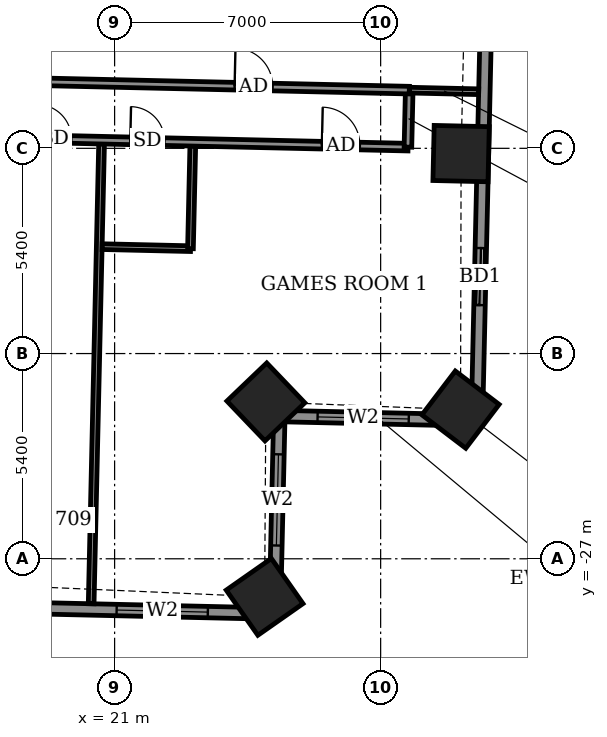
"""IFC4 building model, lengths in metres.
Left out: names, types, materials, properties, quantities, classifications, styles, units other than length and angle.
Written with IfcOpenShell. Run it as: python <this file> out.ifc"""

import sys

from ifc_helpers import new_model, si_unit, direction, frame, frame_2d, origin, origin_2d, place, context, subcontext, project, spatial, rectangle, extrude, element, fill, save


model = new_model("IFC4")
c1 = context("Model", 3, precision=1e-05, world=origin(), true_north=direction((0.0, 1.0)))
c2 = subcontext(c1, "Body", "Model", "MODEL_VIEW")
j1 = project(units=[si_unit("LENGTHUNIT", "METRE"), si_unit("PLANEANGLEUNIT", "RADIAN")], contexts=[c1])
p1 = place(None, origin())
s1 = spatial("IfcSite", under=j1, at=p1, CompositionType="ELEMENT")
p2 = place(p1, origin())
s2 = spatial("IfcBuilding", under=s1, at=p2, CompositionType="ELEMENT")
p3 = place(p2, frame((0.0, 0.0, 71.1)))
s3 = spatial("IfcBuildingStorey", under=s2, at=p3, CompositionType="ELEMENT", Elevation=71.1)
for number, where, z_axis, x_axis in (
    (1, (24.947, -28.002, -0.55), (0.0, 0.0, 1.0), (0.819, 0.574, 0.0)),
    (2, (24.98, -22.873, -0.55), (0.0, 0.0, 1.0), (0.723, 0.691, 0.0)),
    (3, (30.102, -23.076, -0.55), (0.0, 0.0, 1.0), (0.606, 0.796, 0.0)),
    (4, (30.117, -16.339, -0.55), (0.0, 0.0, 1.0), (0.023, 1.0, 0.0)),
):
    element("IfcColumn", number, at=place(p3, frame(where, z_axis=z_axis, x_axis=x_axis)), inside=s3, PredefinedType="COLUMN", context=c2, shape_type="SweptSolid", body=[
        extrude(rectangle(XDim=1.45, YDim=1.45, at=origin_2d()), origin(), (0.0, 0.0, 1.0), 3.6),
    ])
p4 = place(p3, frame((30.533, -23.362, 0.0), z_axis=(0.0, 0.0, 1.0), x_axis=(0.022698800888, 0.999742349027, 0.0)))
e5 = element("IfcWall", 5, at=p4, inside=s3, PredefinedType="SOLIDWALL", context=c2, shape_type="SweptSolid", body=[
    extrude(rectangle(XDim=14.23, YDim=0.3, at=frame_2d((7.115, 0.0))), origin(), (0.0, 0.0, 1.0), 3.05),
])
p5 = place(p4, frame((3.038, 0.0, 0.0)))
e6 = element("IfcOpeningElement", 6, at=p5, cuts=e5, PredefinedType="OPENING", context=c2, shape_type="SweptSolid", body=[
    extrude(rectangle(XDim=1.5, YDim=2.4, at=frame_2d((0.75, 1.2))), frame((0.0, 0.16, 0.0), z_axis=(0.0, -1.0, 0.0), x_axis=(1.0, 0.0, 0.0)), (0.0, 0.0, 1.0), 0.32),
])
p6 = place(p4, frame((9.95, 0.0, 0.9)))
e7 = element("IfcOpeningElement", 7, at=p6, cuts=e5, PredefinedType="OPENING", context=c2, shape_type="SweptSolid", body=[
    extrude(rectangle(XDim=2.4, YDim=1.5, at=frame_2d((1.2, 0.75))), frame((0.0, 0.16, 0.0), z_axis=(0.0, -1.0, 0.0), x_axis=(1.0, 0.0, 0.0)), (0.0, 0.0, 1.0), 0.32),
])
p7 = place(p3, frame((-24.007, -27.326, 0.0), z_axis=(0.0, 0.0, 1.0), x_axis=(0.999742536491, -0.022690542744, 0.0)))
e8 = element("IfcWall", 8, at=p7, inside=s3, PredefinedType="SOLIDWALL", context=c2, shape_type="SweptSolid", body=[
    extrude(rectangle(XDim=49.236, YDim=0.3, at=frame_2d((24.618, 0.0))), origin(), (0.0, 0.0, 1.0), 3.05),
])
p8 = place(p7, frame((1.391, 0.0, 0.0)))
e9 = element("IfcOpeningElement", 9, at=p8, cuts=e8, PredefinedType="OPENING", context=c2, shape_type="SweptSolid", body=[
    extrude(rectangle(XDim=1.2, YDim=2.4, at=frame_2d((0.6, 1.2))), frame((0.0, 0.16, 0.0), z_axis=(0.0, -1.0, 0.0), x_axis=(1.0, 0.0, 0.0)), (0.0, 0.0, 1.0), 0.32),
])
p9 = place(p7, frame((3.901, 0.0, 0.0)))
e10 = element("IfcOpeningElement", 10, at=p9, cuts=e8, PredefinedType="OPENING", context=c2, shape_type="SweptSolid", body=[
    extrude(rectangle(XDim=1.5, YDim=2.4, at=frame_2d((0.75, 1.2))), frame((0.0, 0.16, 0.0), z_axis=(0.0, -1.0, 0.0), x_axis=(1.0, 0.0, 0.0)), (0.0, 0.0, 1.0), 0.32),
])
p10 = place(p7, frame((9.1, 0.0, 0.0)))
e11 = element("IfcOpeningElement", 11, at=p10, cuts=e8, PredefinedType="OPENING", context=c2, shape_type="SweptSolid", body=[
    extrude(rectangle(XDim=1.5, YDim=2.4, at=frame_2d((0.75, 1.2))), frame((0.0, 0.16, 0.0), z_axis=(0.0, -1.0, 0.0), x_axis=(1.0, 0.0, 0.0)), (0.0, 0.0, 1.0), 0.32),
])
p11 = place(p7, frame((14.889, 0.0, 0.0)))
e12 = element("IfcOpeningElement", 12, at=p11, cuts=e8, PredefinedType="OPENING", context=c2, shape_type="SweptSolid", body=[
    extrude(rectangle(XDim=1.5, YDim=2.4, at=frame_2d((0.75, 1.2))), frame((0.0, 0.16, 0.0), z_axis=(0.0, -1.0, 0.0), x_axis=(1.0, 0.0, 0.0)), (0.0, 0.0, 1.0), 0.32),
])
p12 = place(p7, frame((17.952, 0.0, 0.0)))
e13 = element("IfcOpeningElement", 13, at=p12, cuts=e8, PredefinedType="OPENING", context=c2, shape_type="SweptSolid", body=[
    extrude(rectangle(XDim=1.5, YDim=2.4, at=frame_2d((0.75, 1.2))), frame((0.0, 0.16, 0.0), z_axis=(0.0, -1.0, 0.0), x_axis=(1.0, 0.0, 0.0)), (0.0, 0.0, 1.0), 0.32),
])
p13 = place(p7, frame((22.878, 0.0, 0.0)))
e14 = element("IfcOpeningElement", 14, at=p13, cuts=e8, PredefinedType="OPENING", context=c2, shape_type="SweptSolid", body=[
    extrude(rectangle(XDim=1.5, YDim=2.4, at=frame_2d((0.75, 1.2))), frame((0.0, 0.16, 0.0), z_axis=(0.0, -1.0, 0.0), x_axis=(1.0, 0.0, 0.0)), (0.0, 0.0, 1.0), 0.32),
])
p14 = place(p7, frame((26.091, 0.0, 0.0)))
e15 = element("IfcOpeningElement", 15, at=p14, cuts=e8, PredefinedType="OPENING", context=c2, shape_type="SweptSolid", body=[
    extrude(rectangle(XDim=1.2, YDim=2.4, at=frame_2d((0.6, 1.2))), frame((0.0, 0.16, 0.0), z_axis=(0.0, -1.0, 0.0), x_axis=(1.0, 0.0, 0.0)), (0.0, 0.0, 1.0), 0.32),
])
p15 = place(p7, frame((31.754, 0.0, 0.0)))
e16 = element("IfcOpeningElement", 16, at=p15, cuts=e8, PredefinedType="OPENING", context=c2, shape_type="SweptSolid", body=[
    extrude(rectangle(XDim=1.5, YDim=2.4, at=frame_2d((0.75, 1.2))), frame((0.0, 0.16, 0.0), z_axis=(0.0, -1.0, 0.0), x_axis=(1.0, 0.0, 0.0)), (0.0, 0.0, 1.0), 0.32),
])
p16 = place(p7, frame((36.854, 0.0, 0.0)))
e17 = element("IfcOpeningElement", 17, at=p16, cuts=e8, PredefinedType="OPENING", context=c2, shape_type="SweptSolid", body=[
    extrude(rectangle(XDim=1.5, YDim=2.4, at=frame_2d((0.75, 1.2))), frame((0.0, 0.16, 0.0), z_axis=(0.0, -1.0, 0.0), x_axis=(1.0, 0.0, 0.0)), (0.0, 0.0, 1.0), 0.32),
])
p17 = place(p7, frame((39.917, 0.0, 0.0)))
e18 = element("IfcOpeningElement", 18, at=p17, cuts=e8, PredefinedType="OPENING", context=c2, shape_type="SweptSolid", body=[
    extrude(rectangle(XDim=1.5, YDim=2.4, at=frame_2d((0.75, 1.2))), frame((0.0, 0.16, 0.0), z_axis=(0.0, -1.0, 0.0), x_axis=(1.0, 0.0, 0.0)), (0.0, 0.0, 1.0), 0.32),
])
p18 = place(p7, frame((45.072, 0.0, 0.9)))
e19 = element("IfcOpeningElement", 19, at=p18, cuts=e8, PredefinedType="OPENING", context=c2, shape_type="SweptSolid", body=[
    extrude(rectangle(XDim=2.4, YDim=1.5, at=frame_2d((1.2, 0.75))), frame((0.0, 0.16, 0.0), z_axis=(0.0, -1.0, 0.0), x_axis=(1.0, 0.0, 0.0)), (0.0, 0.0, 1.0), 0.32),
])
p19 = place(p3, frame((25.216, -28.443, 0.0), z_axis=(0.0, 0.0, 1.0), x_axis=(0.022674484462, 0.999742900827, 0.0)))
e20 = element("IfcWall", 20, at=p19, inside=s3, PredefinedType="SOLIDWALL", context=c2, shape_type="SweptSolid", body=[
    extrude(rectangle(XDim=5.2, YDim=0.3, at=frame_2d((2.6, 0.0))), origin(), (0.0, 0.0, 1.0), 2.55),
])
p20 = place(p19, frame((1.793, 0.0, 0.9)))
e21 = element("IfcOpeningElement", 21, at=p20, cuts=e20, PredefinedType="OPENING", context=c2, shape_type="SweptSolid", body=[
    extrude(rectangle(XDim=2.4, YDim=1.5, at=frame_2d((1.2, 0.75))), frame((0.0, 0.16, 0.0), z_axis=(0.0, -1.0, 0.0), x_axis=(1.0, 0.0, 0.0)), (0.0, 0.0, 1.0), 0.32),
])
p21 = place(p3, frame((25.334, -23.244, 0.0), z_axis=(0.0, 0.0, 1.0), x_axis=(0.999741811307, -0.022722471786, 0.0)))
e22 = element("IfcWall", 22, at=p21, inside=s3, PredefinedType="SOLIDWALL", context=c2, shape_type="SweptSolid", body=[
    extrude(rectangle(XDim=5.2, YDim=0.3, at=frame_2d((2.6, 0.0))), origin(), (0.0, 0.0, 1.0), 2.55),
])
p22 = place(p21, frame((1.007, 0.0, 0.9)))
e23 = element("IfcOpeningElement", 23, at=p22, cuts=e22, PredefinedType="OPENING", context=c2, shape_type="SweptSolid", body=[
    extrude(rectangle(XDim=2.4, YDim=1.5, at=frame_2d((1.2, 0.75))), frame((0.0, 0.16, 0.0), z_axis=(0.0, -1.0, 0.0), x_axis=(1.0, 0.0, 0.0)), (0.0, 0.0, 1.0), 0.32),
])
p23 = place(p3, frame((20.383, -28.183, 0.0), z_axis=(0.0, 0.0, 1.0), x_axis=(0.022637991173, 0.99974372784, 0.0)))
e24 = element("IfcWall", 24, at=p23, inside=s3, PredefinedType="PARTITIONING", context=c2, shape_type="SweptSolid", body=[
    extrude(rectangle(XDim=12.1, YDim=0.15, at=frame_2d((6.05, 0.0))), origin(), (0.0, 0.0, 1.0), 2.55),
])
p24 = place(p3, frame((20.673, -18.787, 0.0), z_axis=(0.0, 0.0, 1.0), x_axis=(0.999740478815, -0.022781023197, 0.0)))
e25 = element("IfcWall", 25, at=p24, inside=s3, PredefinedType="PARTITIONING", context=c2, shape_type="SweptSolid", body=[
    extrude(rectangle(XDim=2.325, YDim=0.15, at=frame_2d((1.163, 0.0))), origin(), (0.0, 0.0, 1.0), 3.05),
])
p25 = place(p3, frame((22.996, -18.84, 0.0), z_axis=(0.0, 0.0, 1.0), x_axis=(0.022518033722, 0.999746436932, 0.0)))
e26 = element("IfcWall", 26, at=p25, inside=s3, PredefinedType="PARTITIONING", context=c2, shape_type="SweptSolid", body=[
    extrude(rectangle(XDim=2.7, YDim=0.15, at=frame_2d((1.35, 0.0))), origin(), (0.0, 0.0, 1.0), 3.05),
])
p26 = place(p3, frame((-26.151, -14.924, 0.0), z_axis=(0.0, 0.0, 1.0), x_axis=(0.999742750999, -0.022681089575, 0.0)))
e27 = element("IfcWall", 27, at=p26, inside=s3, PredefinedType="PARTITIONING", context=c2, shape_type="SweptSolid", body=[
    extrude(rectangle(XDim=54.886, YDim=0.2, at=frame_2d((27.443, 0.0))), origin(), (0.0, 0.0, 1.0), 3.05),
])
p27 = place(p26, frame((1.345, 0.0, 0.0)))
e28 = element("IfcOpeningElement", 28, at=p27, cuts=e27, PredefinedType="OPENING", context=c2, shape_type="SweptSolid", body=[
    extrude(rectangle(XDim=1.0, YDim=2.1, at=frame_2d((0.5, 1.05))), frame((0.0, 0.11, 0.0), z_axis=(0.0, -1.0, 0.0), x_axis=(1.0, 0.0, 0.0)), (0.0, 0.0, 1.0), 0.22),
])
p28 = place(p26, frame((8.35, 0.0, 0.0)))
e29 = element("IfcOpeningElement", 29, at=p28, cuts=e27, PredefinedType="OPENING", context=c2, shape_type="SweptSolid", body=[
    extrude(rectangle(XDim=0.9, YDim=2.1, at=frame_2d((0.45, 1.05))), frame((0.0, 0.11, 0.0), z_axis=(0.0, -1.0, 0.0), x_axis=(1.0, 0.0, 0.0)), (0.0, 0.0, 1.0), 0.22),
])
p29 = place(p26, frame((10.625, 0.0, 0.0)))
e30 = element("IfcOpeningElement", 30, at=p29, cuts=e27, PredefinedType="OPENING", context=c2, shape_type="SweptSolid", body=[
    extrude(rectangle(XDim=0.9, YDim=2.1, at=frame_2d((0.45, 1.05))), frame((0.0, 0.11, 0.0), z_axis=(0.0, -1.0, 0.0), x_axis=(1.0, 0.0, 0.0)), (0.0, 0.0, 1.0), 0.22),
])
p30 = place(p26, frame((17.675, 0.0, 0.0)))
e31 = element("IfcOpeningElement", 31, at=p30, cuts=e27, PredefinedType="OPENING", context=c2, shape_type="SweptSolid", body=[
    extrude(rectangle(XDim=0.9, YDim=2.1, at=frame_2d((0.45, 1.05))), frame((0.0, 0.11, 0.0), z_axis=(0.0, -1.0, 0.0), x_axis=(1.0, 0.0, 0.0)), (0.0, 0.0, 1.0), 0.22),
])
p31 = place(p26, frame((19.725, 0.0, 0.0)))
e32 = element("IfcOpeningElement", 32, at=p31, cuts=e27, PredefinedType="OPENING", context=c2, shape_type="SweptSolid", body=[
    extrude(rectangle(XDim=0.9, YDim=2.1, at=frame_2d((0.45, 1.05))), frame((0.0, 0.11, 0.0), z_axis=(0.0, -1.0, 0.0), x_axis=(1.0, 0.0, 0.0)), (0.0, 0.0, 1.0), 0.22),
])
p32 = place(p26, frame((26.575, 0.0, 0.0)))
e33 = element("IfcOpeningElement", 33, at=p32, cuts=e27, PredefinedType="OPENING", context=c2, shape_type="SweptSolid", body=[
    extrude(rectangle(XDim=0.9, YDim=2.1, at=frame_2d((0.45, 1.05))), frame((0.0, 0.11, 0.0), z_axis=(0.0, -1.0, 0.0), x_axis=(1.0, 0.0, 0.0)), (0.0, 0.0, 1.0), 0.22),
])
p33 = place(p26, frame((28.75, 0.0, 0.0)))
e34 = element("IfcOpeningElement", 34, at=p33, cuts=e27, PredefinedType="OPENING", context=c2, shape_type="SweptSolid", body=[
    extrude(rectangle(XDim=0.9, YDim=2.1, at=frame_2d((0.45, 1.05))), frame((0.0, 0.11, 0.0), z_axis=(0.0, -1.0, 0.0), x_axis=(1.0, 0.0, 0.0)), (0.0, 0.0, 1.0), 0.22),
])
p34 = place(p26, frame((35.875, 0.0, 0.0)))
e35 = element("IfcOpeningElement", 35, at=p34, cuts=e27, PredefinedType="OPENING", context=c2, shape_type="SweptSolid", body=[
    extrude(rectangle(XDim=0.9, YDim=2.1, at=frame_2d((0.45, 1.05))), frame((0.0, 0.11, 0.0), z_axis=(0.0, -1.0, 0.0), x_axis=(1.0, 0.0, 0.0)), (0.0, 0.0, 1.0), 0.22),
])
p35 = place(p26, frame((38.1, 0.0, 0.0)))
e36 = element("IfcOpeningElement", 36, at=p35, cuts=e27, PredefinedType="OPENING", context=c2, shape_type="SweptSolid", body=[
    extrude(rectangle(XDim=0.9, YDim=2.1, at=frame_2d((0.45, 1.05))), frame((0.0, 0.11, 0.0), z_axis=(0.0, -1.0, 0.0), x_axis=(1.0, 0.0, 0.0)), (0.0, 0.0, 1.0), 0.22),
])
p36 = place(p26, frame((45.125, 0.0, 0.0)))
e37 = element("IfcOpeningElement", 37, at=p36, cuts=e27, PredefinedType="OPENING", context=c2, shape_type="SweptSolid", body=[
    extrude(rectangle(XDim=0.9, YDim=2.1, at=frame_2d((0.45, 1.05))), frame((0.0, 0.11, 0.0), z_axis=(0.0, -1.0, 0.0), x_axis=(1.0, 0.0, 0.0)), (0.0, 0.0, 1.0), 0.22),
])
p37 = place(p26, frame((52.618, 0.0, 0.0)))
e38 = element("IfcOpeningElement", 38, at=p37, cuts=e27, PredefinedType="OPENING", context=c2, shape_type="SweptSolid", body=[
    extrude(rectangle(XDim=1.0, YDim=2.1, at=frame_2d((0.5, 1.05))), frame((0.0, 0.11, 0.0), z_axis=(0.0, -1.0, 0.0), x_axis=(1.0, 0.0, 0.0)), (0.0, 0.0, 1.0), 0.22),
])
p38 = place(p26, frame((47.575, 0.0, 0.0)))
e39 = element("IfcOpeningElement", 39, at=p38, cuts=e27, PredefinedType="OPENING", context=c2, shape_type="SweptSolid", body=[
    extrude(rectangle(XDim=0.9, YDim=2.1, at=frame_2d((0.45, 1.05))), frame((0.0, 0.11, 0.0), z_axis=(0.0, -1.0, 0.0), x_axis=(1.0, 0.0, 0.0)), (0.0, 0.0, 1.0), 0.22),
])
p39 = place(p3, frame((28.718, -16.169, 0.0), z_axis=(0.0, 0.0, 1.0), x_axis=(0.022617910375, 0.999744182344, 0.0)))
e40 = element("IfcWall", 40, at=p39, inside=s3, PredefinedType="PARTITIONING", context=c2, shape_type="SweptSolid", body=[
    extrude(rectangle(XDim=1.5, YDim=0.2, at=frame_2d((0.75, 0.0))), origin(), (0.0, 0.0, 1.0), 3.05),
])
p40 = place(p3, frame((18.382, -14.434, 0.0), z_axis=(0.0, 0.0, 1.0), x_axis=(0.999743763457, -0.022636418209, 0.0)))
e41 = element("IfcWall", 41, at=p40, inside=s3, PredefinedType="PARTITIONING", context=c2, shape_type="SweptSolid", body=[
    extrude(rectangle(XDim=10.375, YDim=0.2, at=frame_2d((5.188, 0.0))), origin(), (0.0, 0.0, 1.0), 3.05),
])
p41 = place(p40, frame((5.777, 0.0, 0.0)))
e42 = element("IfcOpeningElement", 42, at=p41, cuts=e41, PredefinedType="OPENING", context=c2, shape_type="SweptSolid", body=[
    extrude(rectangle(XDim=1.0, YDim=2.1, at=frame_2d((0.5, 1.05))), frame((0.0, 0.11, 0.0), z_axis=(0.0, -1.0, 0.0), x_axis=(1.0, 0.0, 0.0)), (0.0, 0.0, 1.0), 0.22),
])
p42 = place(p3, frame((28.755, -14.669, 0.0), z_axis=(0.0, 0.0, 1.0), x_axis=(0.999735161806, -0.023013175566, 0.0)))
e43 = element("IfcWall", 43, at=p42, inside=s3, PredefinedType="PARTITIONING", context=c2, shape_type="SweptSolid", body=[
    extrude(rectangle(XDim=1.825, YDim=0.15, at=frame_2d((0.912, 0.0))), origin(), (0.0, 0.0, 1.0), 2.55),
])
p43 = place(p5, origin())
e44 = element("IfcDoor", 44, at=p43, inside=s3, OperationType="SLIDING_TO_LEFT", PredefinedType="DOOR", context=c2, shape_type="SweptSolid", body=[
    extrude(rectangle(XDim=1.5, YDim=2.4, at=frame_2d((0.75, 1.2))), frame((0.0, 0.025, 0.0), z_axis=(0.0, -1.0, 0.0), x_axis=(1.0, 0.0, 0.0)), (0.0, 0.0, 1.0), 0.05),
])
fill(e6, e44)
p44 = place(p18, origin())
e45 = element("IfcWindow", 45, at=p44, inside=s3, PartitioningType="DOUBLE_PANEL_VERTICAL", PredefinedType="WINDOW", context=c2, shape_type="SweptSolid", body=[
    extrude(rectangle(XDim=2.4, YDim=1.5, at=frame_2d((1.2, 0.75))), frame((0.0, 0.03, 0.0), z_axis=(0.0, -1.0, 0.0), x_axis=(1.0, 0.0, 0.0)), (0.0, 0.0, 1.0), 0.06),
])
fill(e19, e45)
p45 = place(p20, origin())
e46 = element("IfcWindow", 46, at=p45, inside=s3, PartitioningType="DOUBLE_PANEL_VERTICAL", PredefinedType="WINDOW", context=c2, shape_type="SweptSolid", body=[
    extrude(rectangle(XDim=2.4, YDim=1.5, at=frame_2d((1.2, 0.75))), frame((0.0, 0.03, 0.0), z_axis=(0.0, -1.0, 0.0), x_axis=(1.0, 0.0, 0.0)), (0.0, 0.0, 1.0), 0.06),
])
fill(e21, e46)
p46 = place(p22, origin())
e47 = element("IfcWindow", 47, at=p46, inside=s3, PartitioningType="DOUBLE_PANEL_VERTICAL", PredefinedType="WINDOW", context=c2, shape_type="SweptSolid", body=[
    extrude(rectangle(XDim=2.4, YDim=1.5, at=frame_2d((1.2, 0.75))), frame((0.0, 0.03, 0.0), z_axis=(0.0, -1.0, 0.0), x_axis=(1.0, 0.0, 0.0)), (0.0, 0.0, 1.0), 0.06),
])
fill(e23, e47)
p47 = place(p36, origin())
e48 = element("IfcDoor", 48, at=p47, inside=s3, OperationType="SINGLE_SWING_LEFT", PredefinedType="DOOR", context=c2, shape_type="SweptSolid", body=[
    extrude(rectangle(XDim=0.9, YDim=2.1, at=frame_2d((0.45, 1.05))), frame((0.0, 0.025, 0.0), z_axis=(0.0, -1.0, 0.0), x_axis=(1.0, 0.0, 0.0)), (0.0, 0.0, 1.0), 0.05),
])
fill(e37, e48)
p48 = place(p37, origin())
e49 = element("IfcDoor", 49, at=p48, inside=s3, OperationType="SINGLE_SWING_RIGHT", PredefinedType="DOOR", context=c2, shape_type="SweptSolid", body=[
    extrude(rectangle(XDim=1.0, YDim=2.1, at=frame_2d((0.5, 1.05))), frame((0.0, 0.025, 0.0), z_axis=(0.0, -1.0, 0.0), x_axis=(1.0, 0.0, 0.0)), (0.0, 0.0, 1.0), 0.05),
])
fill(e38, e49)
p49 = place(p38, origin())
e50 = element("IfcDoor", 50, at=p49, inside=s3, OperationType="SINGLE_SWING_LEFT", PredefinedType="DOOR", context=c2, shape_type="SweptSolid", body=[
    extrude(rectangle(XDim=0.9, YDim=2.1, at=frame_2d((0.45, 1.05))), frame((0.0, 0.025, 0.0), z_axis=(0.0, -1.0, 0.0), x_axis=(1.0, 0.0, 0.0)), (0.0, 0.0, 1.0), 0.05),
])
fill(e39, e50)
p50 = place(p41, origin())
e51 = element("IfcDoor", 51, at=p50, inside=s3, OperationType="SINGLE_SWING_LEFT", PredefinedType="DOOR", context=c2, shape_type="SweptSolid", body=[
    extrude(rectangle(XDim=1.0, YDim=2.1, at=frame_2d((0.5, 1.05))), frame((0.0, 0.025, 0.0), z_axis=(0.0, -1.0, 0.0), x_axis=(1.0, 0.0, 0.0)), (0.0, 0.0, 1.0), 0.05),
])
fill(e42, e51)
save(model, sys.argv[1])
